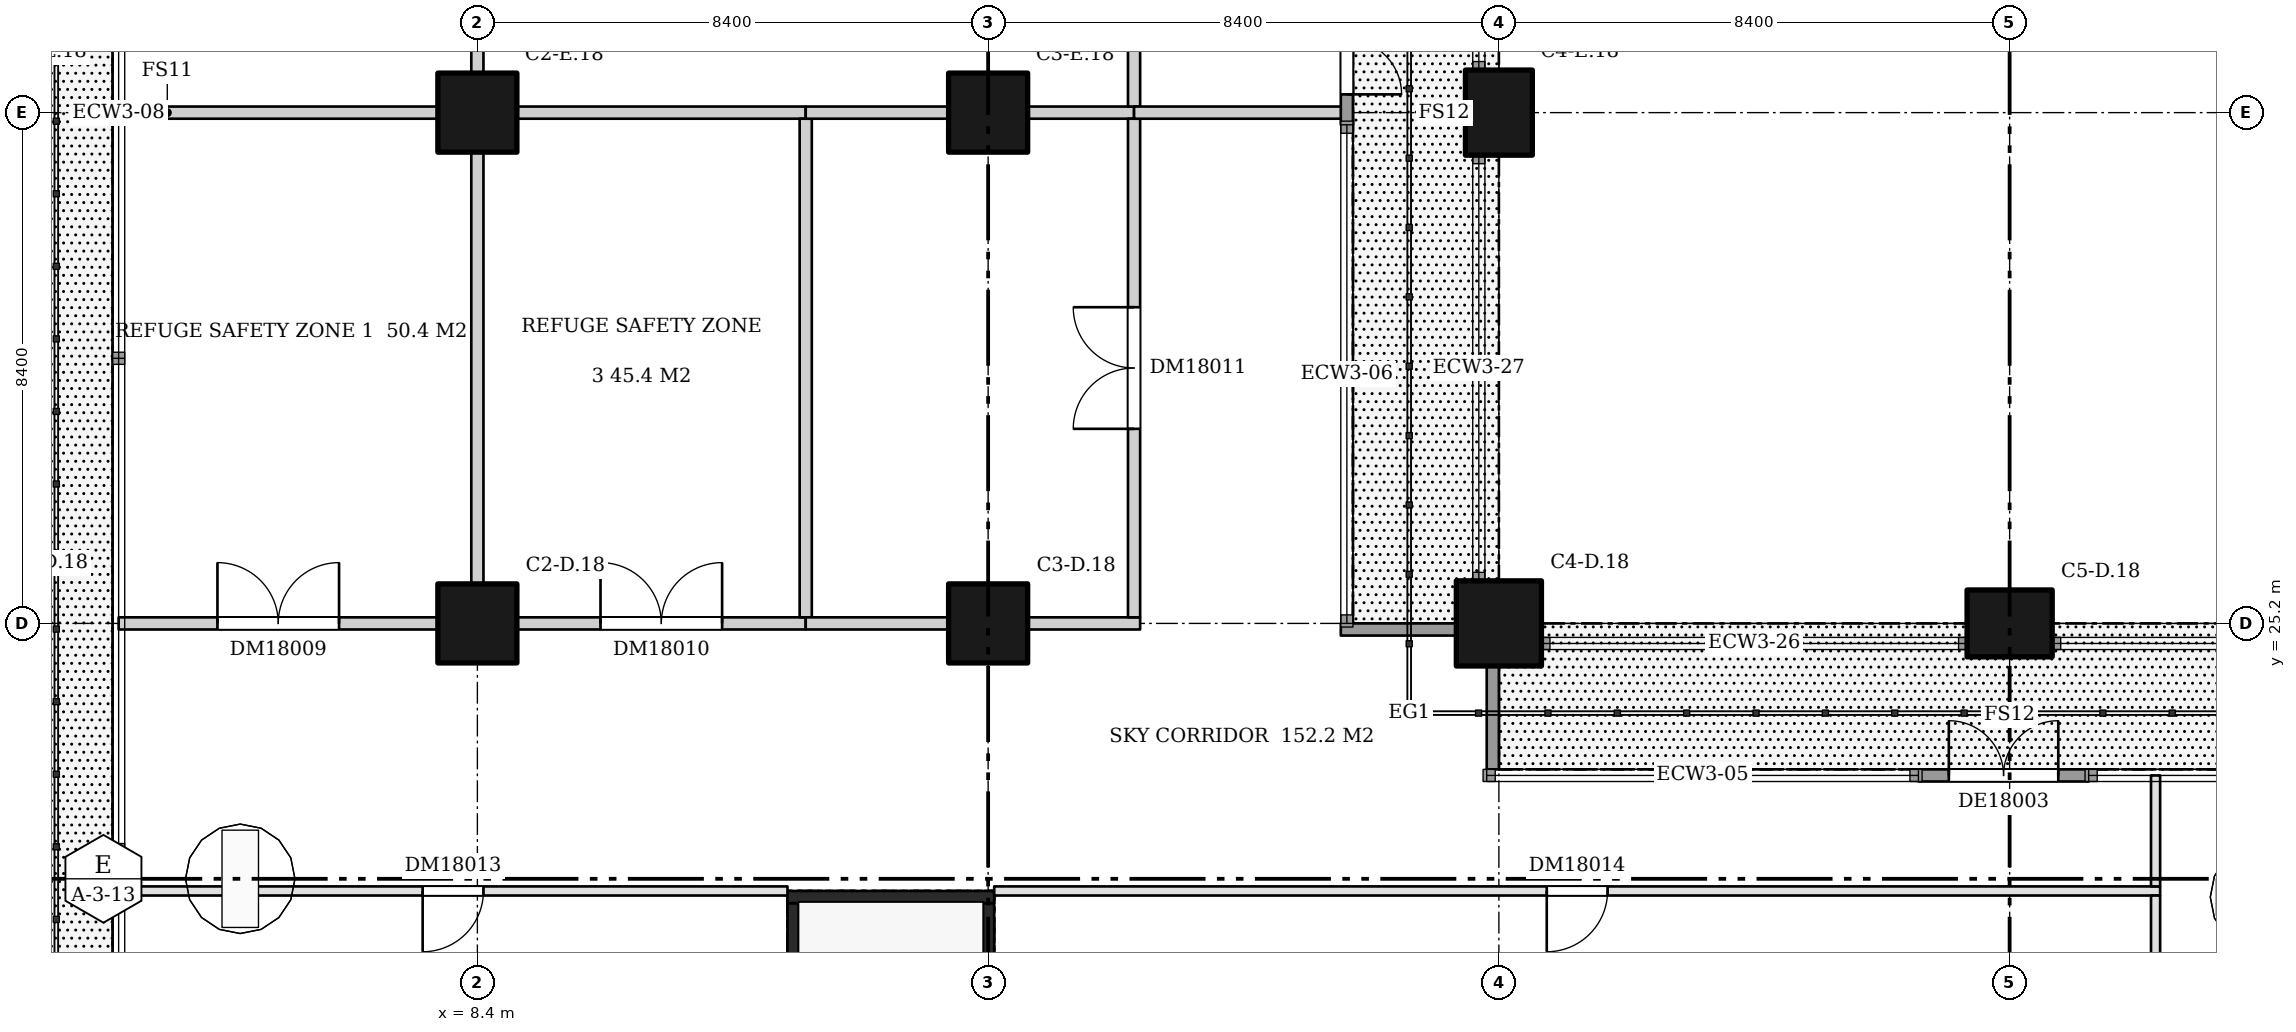
"""IFC4 building model, lengths in metres.
Left out: names, types, materials, properties, quantities, classifications, styles, units other than length and angle.
Written with IfcOpenShell. Run it as: python <this file> out.ifc"""

import sys

from ifc_helpers import new_model, si_unit, direction, frame, frame_2d, origin, origin_2d, place, context, subcontext, project, spatial, rectangle, extrude, element, fill, save


model = new_model("IFC4")
c1 = context("Model", 3, precision=1e-05, world=origin(), true_north=direction((0.0, 1.0)))
c2 = subcontext(c1, "Body", "Model", "MODEL_VIEW")
j1 = project(units=[si_unit("LENGTHUNIT", "METRE"), si_unit("PLANEANGLEUNIT", "RADIAN")], contexts=[c1])
p1 = place(None, origin())
s1 = spatial("IfcSite", under=j1, at=p1, CompositionType="ELEMENT")
p2 = place(p1, origin())
s2 = spatial("IfcBuilding", under=s1, at=p2, CompositionType="ELEMENT")
p3 = place(p2, frame((0.0, 0.0, 74.2)))
s3 = spatial("IfcBuildingStorey", under=s2, at=p3, CompositionType="ELEMENT", Elevation=74.2)
for number, where, z_axis, x_axis in (
    (1, (8.4, 25.2, 0.0), (0.0, 0.0, 1.0), (1.0, 0.0, 0.0)),
    (2, (8.4, 33.6, 0.0), (0.0, 0.0, 1.0), (1.0, 0.0, 0.0)),
    (3, (16.8, 25.2, 0.0), (0.0, 0.0, 1.0), (1.0, 0.0, 0.0)),
    (4, (16.8, 33.6, 0.0), (0.0, 0.0, 1.0), (1.0, 0.0, 0.0)),
):
    element("IfcColumn", number, at=place(p3, frame(where, z_axis=z_axis, x_axis=x_axis)), inside=s3, PredefinedType="COLUMN", context=c2, shape_type="SweptSolid", body=[
        extrude(rectangle(XDim=1.3, YDim=1.3, at=origin_2d()), origin(), (0.0, 0.0, 1.0), 6.72),
    ])
p4 = place(p3, frame((25.2, 25.2, 0.0), z_axis=(0.0, 0.0, 1.0), x_axis=(1.0, 0.0, 0.0)))
e5 = element("IfcColumn", 5, at=p4, inside=s3, PredefinedType="COLUMN", context=c2, shape_type="SweptSolid", body=[
    extrude(rectangle(XDim=1.4, YDim=1.4, at=origin_2d()), origin(), (0.0, 0.0, 1.0), 6.72),
])
for number, where, z_axis, x_axis in (
    (6, (25.2, 33.6, 0.0), (0.0, 0.0, 1.0), (0.0, 1.0, 0.0)),
    (7, (33.6, 25.2, 0.0), (0.0, 0.0, 1.0), (1.0, 0.0, 0.0)),
):
    element("IfcColumn", number, at=place(p3, frame(where, z_axis=z_axis, x_axis=x_axis)), inside=s3, PredefinedType="COLUMN", context=c2, shape_type="SweptSolid", body=[
        extrude(rectangle(XDim=1.4, YDim=1.1, at=origin_2d()), origin(), (0.0, 0.0, 1.0), 6.72),
    ])
p5 = place(p3, frame((13.6, 13.8, 0.0), z_axis=(0.0, 0.0, 1.0), x_axis=(0.0, 1.0, 0.0)))
e8 = element("IfcWall", 8, at=p5, inside=s3, PredefinedType="SHEAR", context=c2, shape_type="SweptSolid", body=[
    extrude(rectangle(XDim=6.8, YDim=0.2, at=frame_2d((3.4, 0.0))), origin(), (0.0, 0.0, 1.0), 6.72),
])
p6 = place(p5, frame((0.2, 0.0, 0.0)))
e9 = element("IfcOpeningElement", 9, at=p6, cuts=e8, PredefinedType="OPENING", context=c2, shape_type="SweptSolid", body=[
    extrude(rectangle(XDim=1.0, YDim=2.1, at=frame_2d((0.5, 1.05))), frame((0.0, 0.11, 0.0), z_axis=(0.0, -1.0, 0.0), x_axis=(1.0, 0.0, 0.0)), (0.0, 0.0, 1.0), 0.22),
])
p7 = place(p3, frame((16.8, 13.8, 0.0), z_axis=(0.0, 0.0, 1.0), x_axis=(0.0, 1.0, 0.0)))
e10 = element("IfcWall", 10, at=p7, inside=s3, PredefinedType="SHEAR", context=c2, shape_type="SweptSolid", body=[
    extrude(rectangle(XDim=6.8, YDim=0.2, at=frame_2d((3.4, 0.0))), origin(), (0.0, 0.0, 1.0), 6.72),
])
p8 = place(p3, frame((13.5, 20.7, 0.0), z_axis=(0.0, 0.0, 1.0), x_axis=(1.0, 0.0, 0.0)))
e11 = element("IfcWall", 11, at=p8, inside=s3, PredefinedType="SHEAR", context=c2, shape_type="SweptSolid", body=[
    extrude(rectangle(XDim=3.4, YDim=0.2, at=frame_2d((1.7, 0.0))), origin(), (0.0, 0.0, 1.0), 6.72),
])
p9 = place(p3, frame((2.5, 20.8, 0.0), z_axis=(0.0, 0.0, 1.0), x_axis=(1.0, 0.0, 0.0)))
e12 = element("IfcWall", 12, at=p9, inside=s3, PredefinedType="PARTITIONING", context=c2, shape_type="SweptSolid", body=[
    extrude(rectangle(XDim=11.0, YDim=0.15, at=frame_2d((5.5, 0.0))), origin(), (0.0, 0.0, 1.0), 6.72),
])
p10 = place(p9, frame((5.0, 0.0, 0.0)))
e13 = element("IfcOpeningElement", 13, at=p10, cuts=e12, PredefinedType="OPENING", context=c2, shape_type="SweptSolid", body=[
    extrude(rectangle(XDim=1.0, YDim=2.1, at=frame_2d((0.5, 1.05))), frame((0.0, 0.085, 0.0), z_axis=(0.0, -1.0, 0.0), x_axis=(1.0, 0.0, 0.0)), (0.0, 0.0, 1.0), 0.17),
])
p11 = place(p3, frame((2.5, 25.2, 0.0), z_axis=(0.0, 0.0, 1.0), x_axis=(1.0, 0.0, 0.0)))
e14 = element("IfcWall", 14, at=p11, inside=s3, PredefinedType="PARTITIONING", context=c2, shape_type="SweptSolid", body=[
    extrude(rectangle(XDim=5.25, YDim=0.2, at=frame_2d((2.625, 0.0))), origin(), (0.0, 0.0, 1.0), 6.72),
])
p12 = place(p11, frame((1.625, 0.0, 0.0)))
e15 = element("IfcOpeningElement", 15, at=p12, cuts=e14, PredefinedType="OPENING", context=c2, shape_type="SweptSolid", body=[
    extrude(rectangle(XDim=2.0, YDim=2.1, at=frame_2d((1.0, 1.05))), frame((0.0, 0.11, 0.0), z_axis=(0.0, -1.0, 0.0), x_axis=(1.0, 0.0, 0.0)), (0.0, 0.0, 1.0), 0.22),
])
p13 = place(p3, frame((2.5, 33.6, 0.0), z_axis=(0.0, 0.0, 1.0), x_axis=(1.0, 0.0, 0.0)))
e16 = element("IfcWall", 16, at=p13, inside=s3, PredefinedType="PARTITIONING", context=c2, shape_type="SweptSolid", body=[
    extrude(rectangle(XDim=5.25, YDim=0.2, at=frame_2d((2.625, 0.0))), origin(), (0.0, 0.0, 1.0), 6.72),
])
p14 = place(p3, frame((8.4, 25.85, 0.0), z_axis=(0.0, 0.0, 1.0), x_axis=(0.0, 1.0, 0.0)))
e17 = element("IfcWall", 17, at=p14, inside=s3, PredefinedType="PARTITIONING", context=c2, shape_type="SweptSolid", body=[
    extrude(rectangle(XDim=7.1, YDim=0.2, at=frame_2d((3.55, 0.0))), origin(), (0.0, 0.0, 1.0), 6.72),
])
p15 = place(p3, frame((9.05, 25.2, 0.0), z_axis=(0.0, 0.0, 1.0), x_axis=(1.0, 0.0, 0.0)))
e18 = element("IfcWall", 18, at=p15, inside=s3, PredefinedType="PARTITIONING", context=c2, shape_type="SweptSolid", body=[
    extrude(rectangle(XDim=4.75, YDim=0.2, at=frame_2d((2.375, 0.0))), origin(), (0.0, 0.0, 1.0), 6.72),
])
p16 = place(p15, frame((1.375, 0.0, 0.0)))
e19 = element("IfcOpeningElement", 19, at=p16, cuts=e18, PredefinedType="OPENING", context=c2, shape_type="SweptSolid", body=[
    extrude(rectangle(XDim=2.0, YDim=2.1, at=frame_2d((1.0, 1.05))), frame((0.0, 0.11, 0.0), z_axis=(0.0, -1.0, 0.0), x_axis=(1.0, 0.0, 0.0)), (0.0, 0.0, 1.0), 0.22),
])
p17 = place(p3, frame((8.4, 34.25, 0.0), z_axis=(0.0, 0.0, 1.0), x_axis=(0.0, 1.0, 0.0)))
e20 = element("IfcWall", 20, at=p17, inside=s3, PredefinedType="PARTITIONING", context=c2, shape_type="SweptSolid", body=[
    extrude(rectangle(XDim=4.05, YDim=0.2, at=frame_2d((2.025, 0.0))), origin(), (0.0, 0.0, 1.0), 6.72),
])
p18 = place(p3, frame((9.05, 33.6, 0.0), z_axis=(0.0, 0.0, 1.0), x_axis=(1.0, 0.0, 0.0)))
e21 = element("IfcWall", 21, at=p18, inside=s3, PredefinedType="PARTITIONING", context=c2, shape_type="SweptSolid", body=[
    extrude(rectangle(XDim=4.75, YDim=0.2, at=frame_2d((2.375, 0.0))), origin(), (0.0, 0.0, 1.0), 6.72),
])
p19 = place(p3, frame((13.8, 25.3, 0.0), z_axis=(0.0, 0.0, 1.0), x_axis=(0.0, 1.0, 0.0)))
e22 = element("IfcWall", 22, at=p19, inside=s3, PredefinedType="PARTITIONING", context=c2, shape_type="SweptSolid", body=[
    extrude(rectangle(XDim=8.2, YDim=0.2, at=frame_2d((4.1, 0.0))), origin(), (0.0, 0.0, 1.0), 6.72),
])
p20 = place(p3, frame((13.8, 25.2, 0.0), z_axis=(0.0, 0.0, 1.0), x_axis=(1.0, 0.0, 0.0)))
e23 = element("IfcWall", 23, at=p20, inside=s3, PredefinedType="PARTITIONING", context=c2, shape_type="SweptSolid", body=[
    extrude(rectangle(XDim=2.35, YDim=0.2, at=frame_2d((1.175, 0.0))), origin(), (0.0, 0.0, 1.0), 6.72),
])
p21 = place(p3, frame((17.45, 25.2, 0.0), z_axis=(0.0, 0.0, 1.0), x_axis=(1.0, 0.0, 0.0)))
e24 = element("IfcWall", 24, at=p21, inside=s3, PredefinedType="PARTITIONING", context=c2, shape_type="SweptSolid", body=[
    extrude(rectangle(XDim=1.85, YDim=0.2, at=frame_2d((0.925, 0.0))), origin(), (0.0, 0.0, 1.0), 6.72),
])
p22 = place(p3, frame((13.8, 33.6, 0.0), z_axis=(0.0, 0.0, 1.0), x_axis=(1.0, 0.0, 0.0)))
e25 = element("IfcWall", 25, at=p22, inside=s3, PredefinedType="PARTITIONING", context=c2, shape_type="SweptSolid", body=[
    extrude(rectangle(XDim=2.35, YDim=0.2, at=frame_2d((1.175, 0.0))), origin(), (0.0, 0.0, 1.0), 6.72),
])
p23 = place(p3, frame((17.45, 33.6, 0.0), z_axis=(0.0, 0.0, 1.0), x_axis=(1.0, 0.0, 0.0)))
e26 = element("IfcWall", 26, at=p23, inside=s3, PredefinedType="PARTITIONING", context=c2, shape_type="SweptSolid", body=[
    extrude(rectangle(XDim=1.75, YDim=0.2, at=frame_2d((0.875, 0.0))), origin(), (0.0, 0.0, 1.0), 6.72),
])
p24 = place(p3, frame((16.9, 20.8, 0.0), z_axis=(0.0, 0.0, 1.0), x_axis=(1.0, 0.0, 0.0)))
e27 = element("IfcWall", 27, at=p24, inside=s3, PredefinedType="PARTITIONING", context=c2, shape_type="SweptSolid", body=[
    extrude(rectangle(XDim=19.175, YDim=0.15, at=frame_2d((9.587, 0.0))), origin(), (0.0, 0.0, 1.0), 6.72),
])
p25 = place(p24, frame((9.087, 0.0, 0.0)))
e28 = element("IfcOpeningElement", 28, at=p25, cuts=e27, PredefinedType="OPENING", context=c2, shape_type="SweptSolid", body=[
    extrude(rectangle(XDim=1.0, YDim=2.1, at=frame_2d((0.5, 1.05))), frame((0.0, 0.085, 0.0), z_axis=(0.0, -1.0, 0.0), x_axis=(1.0, 0.0, 0.0)), (0.0, 0.0, 1.0), 0.17),
])
p26 = place(p3, frame((19.2, 25.3, 0.0), z_axis=(0.0, 0.0, 1.0), x_axis=(0.0, 1.0, 0.0)))
e29 = element("IfcWall", 29, at=p26, inside=s3, PredefinedType="PARTITIONING", context=c2, shape_type="SweptSolid", body=[
    extrude(rectangle(XDim=8.2, YDim=0.2, at=frame_2d((4.1, 0.0))), origin(), (0.0, 0.0, 1.0), 6.72),
])
p27 = place(p26, frame((3.1, 0.0, 0.0)))
e30 = element("IfcOpeningElement", 30, at=p27, cuts=e29, PredefinedType="OPENING", context=c2, shape_type="SweptSolid", body=[
    extrude(rectangle(XDim=2.0, YDim=2.1, at=frame_2d((1.0, 1.05))), frame((0.0, 0.11, 0.0), z_axis=(0.0, -1.0, 0.0), x_axis=(1.0, 0.0, 0.0)), (0.0, 0.0, 1.0), 0.22),
])
p28 = place(p3, frame((19.2, 33.7, 0.0), z_axis=(0.0, 0.0, 1.0), x_axis=(0.0, 1.0, 0.0)))
e31 = element("IfcWall", 31, at=p28, inside=s3, PredefinedType="PARTITIONING", context=c2, shape_type="SweptSolid", body=[
    extrude(rectangle(XDim=4.0, YDim=0.2, at=frame_2d((2.0, 0.0))), origin(), (0.0, 0.0, 1.0), 6.72),
])
p29 = place(p28, frame((1.5, 0.0, 0.0)))
e32 = element("IfcOpeningElement", 32, at=p29, cuts=e31, PredefinedType="OPENING", context=c2, shape_type="SweptSolid", body=[
    extrude(rectangle(XDim=1.0, YDim=2.1, at=frame_2d((0.5, 1.05))), frame((0.0, 0.11, 0.0), z_axis=(0.0, -1.0, 0.0), x_axis=(1.0, 0.0, 0.0)), (0.0, 0.0, 1.0), 0.22),
])
p30 = place(p3, frame((19.2, 33.6, 0.0), z_axis=(0.0, 0.0, 1.0), x_axis=(1.0, 0.0, 0.0)))
e33 = element("IfcWall", 33, at=p30, inside=s3, PredefinedType="PARTITIONING", context=c2, shape_type="SweptSolid", body=[
    extrude(rectangle(XDim=3.5, YDim=0.2, at=frame_2d((1.75, 0.0))), origin(), (0.0, 0.0, 1.0), 6.72),
])
p31 = place(p3, frame((36.0, 16.9, 0.0), z_axis=(0.0, 0.0, 1.0), x_axis=(0.0, 1.0, 0.0)))
e34 = element("IfcWall", 34, at=p31, inside=s3, PredefinedType="PARTITIONING", context=c2, shape_type="SweptSolid", body=[
    extrude(rectangle(XDim=3.825, YDim=0.15, at=frame_2d((1.913, 0.0))), origin(), (0.0, 0.0, 1.0), 6.72),
])
p32 = place(p3, frame((36.0, 20.875, 0.0), z_axis=(0.0, 0.0, 1.0), x_axis=(0.0, 1.0, 0.0)))
e35 = element("IfcWall", 35, at=p32, inside=s3, PredefinedType="PARTITIONING", context=c2, shape_type="SweptSolid", body=[
    extrude(rectangle(XDim=1.825, YDim=0.15, at=frame_2d((0.913, 0.0))), origin(), (0.0, 0.0, 1.0), 6.72),
])
p33 = place(p3, frame((34.9, 22.7, 0.0), z_axis=(0.0, 0.0, 1.0), x_axis=(-1.0, 0.0, 0.0)))
e36 = element("IfcWall", 36, at=p33, inside=s3, PredefinedType="SOLIDWALL", context=c2, shape_type="SweptSolid", body=[
    extrude(rectangle(XDim=2.8, YDim=0.2, at=frame_2d((1.4, 0.0))), origin(), (0.0, 0.0, 1.0), 6.72),
])
p34 = place(p33, frame((0.5, 0.0, 0.0)))
e37 = element("IfcOpeningElement", 37, at=p34, cuts=e36, PredefinedType="OPENING", context=c2, shape_type="SweptSolid", body=[
    extrude(rectangle(XDim=1.8, YDim=2.4, at=frame_2d((0.9, 1.2))), frame((0.0, 0.11, 0.0), z_axis=(0.0, -1.0, 0.0), x_axis=(1.0, 0.0, 0.0)), (0.0, 0.0, 1.0), 0.22),
])
p35 = place(p3, frame((25.1, 22.8, 0.0), z_axis=(0.0, 0.0, 1.0), x_axis=(0.0, 1.0, 0.0)))
e38 = element("IfcWall", 38, at=p35, inside=s3, PredefinedType="SOLIDWALL", context=c2, shape_type="SweptSolid", body=[
    extrude(rectangle(XDim=1.7, YDim=0.2, at=frame_2d((0.85, 0.0))), origin(), (0.0, 0.0, 1.0), 6.72),
])
p36 = place(p3, frame((24.5, 25.1, 0.0), z_axis=(0.0, 0.0, 1.0), x_axis=(-1.0, 0.0, 0.0)))
e39 = element("IfcWall", 39, at=p36, inside=s3, PredefinedType="SOLIDWALL", context=c2, shape_type="SweptSolid", body=[
    extrude(rectangle(XDim=1.9, YDim=0.2, at=frame_2d((0.95, 0.0))), origin(), (0.0, 0.0, 1.0), 6.72),
])
p37 = place(p3, frame((22.7, 33.4, 0.0), z_axis=(0.0, 0.0, 1.0), x_axis=(0.0, 1.0, 0.0)))
e40 = element("IfcWall", 40, at=p37, inside=s3, PredefinedType="SOLIDWALL", context=c2, shape_type="SweptSolid", body=[
    extrude(rectangle(XDim=2.8, YDim=0.2, at=frame_2d((1.4, 0.0))), origin(), (0.0, 0.0, 1.0), 6.72),
])
p38 = place(p37, frame((0.5, 0.0, 0.0)))
e41 = element("IfcOpeningElement", 41, at=p38, cuts=e40, PredefinedType="OPENING", context=c2, shape_type="SweptSolid", body=[
    extrude(rectangle(XDim=1.8, YDim=2.4, at=frame_2d((0.9, 1.2))), frame((0.0, 0.11, 0.0), z_axis=(0.0, -1.0, 0.0), x_axis=(1.0, 0.0, 0.0)), (0.0, 0.0, 1.0), 0.22),
])
p39 = place(p12, origin())
e42 = element("IfcDoor", 42, at=p39, inside=s3, OperationType="DOUBLE_DOOR_SINGLE_SWING", PredefinedType="DOOR", context=c2, shape_type="SweptSolid", body=[
    extrude(rectangle(XDim=2.0, YDim=2.1, at=frame_2d((1.0, 1.05))), frame((0.0, 0.025, 0.0), z_axis=(0.0, -1.0, 0.0), x_axis=(1.0, 0.0, 0.0)), (0.0, 0.0, 1.0), 0.05),
])
fill(e15, e42)
p40 = place(p16, origin())
e43 = element("IfcDoor", 43, at=p40, inside=s3, OperationType="DOUBLE_DOOR_SINGLE_SWING", PredefinedType="DOOR", context=c2, shape_type="SweptSolid", body=[
    extrude(rectangle(XDim=2.0, YDim=2.1, at=frame_2d((1.0, 1.05))), frame((0.0, 0.025, 0.0), z_axis=(0.0, -1.0, 0.0), x_axis=(1.0, 0.0, 0.0)), (0.0, 0.0, 1.0), 0.05),
])
fill(e19, e43)
p41 = place(p27, origin())
e44 = element("IfcDoor", 44, at=p41, inside=s3, OperationType="DOUBLE_DOOR_SINGLE_SWING", PredefinedType="DOOR", context=c2, shape_type="SweptSolid", body=[
    extrude(rectangle(XDim=2.0, YDim=2.1, at=frame_2d((1.0, 1.05))), frame((0.0, 0.025, 0.0), z_axis=(0.0, -1.0, 0.0), x_axis=(1.0, 0.0, 0.0)), (0.0, 0.0, 1.0), 0.05),
])
fill(e30, e44)
p42 = place(p10, frame((1.0, 0.0, 0.0), z_axis=(0.0, 0.0, 1.0), x_axis=(-1.0, 0.0, 0.0)))
e45 = element("IfcDoor", 45, at=p42, inside=s3, OperationType="SINGLE_SWING_RIGHT", PredefinedType="DOOR", context=c2, shape_type="SweptSolid", body=[
    extrude(rectangle(XDim=1.0, YDim=2.1, at=frame_2d((0.5, 1.05))), frame((0.0, 0.025, 0.0), z_axis=(0.0, -1.0, 0.0), x_axis=(1.0, 0.0, 0.0)), (0.0, 0.0, 1.0), 0.05),
])
fill(e13, e45)
p43 = place(p25, frame((1.0, 0.0, 0.0), z_axis=(0.0, 0.0, 1.0), x_axis=(-1.0, 0.0, 0.0)))
e46 = element("IfcDoor", 46, at=p43, inside=s3, OperationType="SINGLE_SWING_RIGHT", PredefinedType="DOOR", context=c2, shape_type="SweptSolid", body=[
    extrude(rectangle(XDim=1.0, YDim=2.1, at=frame_2d((0.5, 1.05))), frame((0.0, 0.025, 0.0), z_axis=(0.0, -1.0, 0.0), x_axis=(1.0, 0.0, 0.0)), (0.0, 0.0, 1.0), 0.05),
])
fill(e28, e46)
p44 = place(p34, frame((1.8, 0.0, 0.0), z_axis=(0.0, 0.0, 1.0), x_axis=(-1.0, 0.0, 0.0)))
e47 = element("IfcDoor", 47, at=p44, inside=s3, OperationType="DOUBLE_DOOR_SINGLE_SWING", PredefinedType="DOOR", context=c2, shape_type="SweptSolid", body=[
    extrude(rectangle(XDim=1.8, YDim=2.4, at=frame_2d((0.9, 1.2))), frame((0.0, 0.025, 0.0), z_axis=(0.0, -1.0, 0.0), x_axis=(1.0, 0.0, 0.0)), (0.0, 0.0, 1.0), 0.05),
])
fill(e37, e47)
p45 = place(p38, frame((1.8, 0.0, 0.0), z_axis=(0.0, 0.0, 1.0), x_axis=(-1.0, 0.0, 0.0)))
e48 = element("IfcDoor", 48, at=p45, inside=s3, OperationType="DOUBLE_DOOR_SINGLE_SWING", PredefinedType="DOOR", context=c2, shape_type="SweptSolid", body=[
    extrude(rectangle(XDim=1.8, YDim=2.4, at=frame_2d((0.9, 1.2))), frame((0.0, 0.025, 0.0), z_axis=(0.0, -1.0, 0.0), x_axis=(1.0, 0.0, 0.0)), (0.0, 0.0, 1.0), 0.05),
])
fill(e41, e48)
save(model, sys.argv[1])
